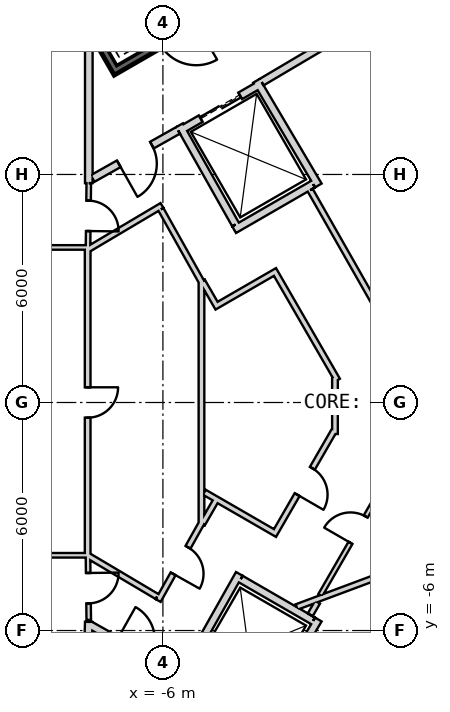
"""IFC4 building model, lengths in metres.
Left out: names, types, materials, properties, quantities, classifications, styles, units other than length and angle.
Written with IfcOpenShell. Run it as: python <this file> out.ifc"""

import sys

from ifc_helpers import new_model, si_unit, direction, frame, frame_2d, origin, place, context, subcontext, project, spatial, rectangle, extrude, element, fill, save


model = new_model("IFC4")
c1 = context("Model", 3, precision=1e-05, world=origin(), true_north=direction((0.0, 1.0)))
c2 = subcontext(c1, "Body", "Model", "MODEL_VIEW")
j1 = project(units=[si_unit("LENGTHUNIT", "METRE"), si_unit("PLANEANGLEUNIT", "RADIAN")], contexts=[c1])
p1 = place(None, origin())
s1 = spatial("IfcSite", under=j1, at=p1, CompositionType="ELEMENT")
p2 = place(p1, origin())
s2 = spatial("IfcBuilding", under=s1, at=p2, CompositionType="ELEMENT")
p3 = place(p2, frame((0.0, 0.0, 404.8)))
s3 = spatial("IfcBuildingStorey", under=s2, at=p3, CompositionType="ELEMENT", Elevation=404.8)
p4 = place(p3, frame((19.475, 2.208, 0.0), z_axis=(0.0, 0.0, 1.0), x_axis=(-0.866028369851, 0.499994862586, 0.0)))
e1 = element("IfcWall", 1, at=p4, inside=s3, PredefinedType="SHEAR", context=c2, shape_type="SweptSolid", body=[
    extrude(rectangle(XDim=31.523, YDim=0.9, at=frame_2d((15.762, 0.0))), origin(), (0.0, 0.0, 1.0), 5.5),
])
p5 = place(p4, frame((3.612, 0.0, 0.0)))
e2 = element("IfcOpeningElement", 2, at=p5, cuts=e1, PredefinedType="OPENING", context=c2, shape_type="SweptSolid", body=[
    extrude(rectangle(XDim=1.2, YDim=2.4, at=frame_2d((0.6, 1.2))), frame((0.0, 0.46, 0.0), z_axis=(0.0, -1.0, 0.0), x_axis=(1.0, 0.0, 0.0)), (0.0, 0.0, 1.0), 0.92),
])
p6 = place(p4, frame((26.712, 0.0, 0.0)))
e3 = element("IfcOpeningElement", 3, at=p6, cuts=e1, PredefinedType="OPENING", context=c2, shape_type="SweptSolid", body=[
    extrude(rectangle(XDim=1.2, YDim=2.4, at=frame_2d((0.6, 1.2))), frame((0.0, 0.46, 0.0), z_axis=(0.0, -1.0, 0.0), x_axis=(1.0, 0.0, 0.0)), (0.0, 0.0, 1.0), 0.92),
])
p7 = place(p3, frame((-7.825, -17.97, 0.0), z_axis=(0.0, 0.0, 1.0), x_axis=(0.866028369851, 0.499994862586, 0.0)))
e4 = element("IfcWall", 4, at=p7, inside=s3, PredefinedType="SHEAR", context=c2, shape_type="SweptSolid", body=[
    extrude(rectangle(XDim=31.523, YDim=0.9, at=frame_2d((15.762, 0.0))), origin(), (0.0, 0.0, 1.0), 5.5),
])
p8 = place(p7, frame((7.062, 0.0, 0.0)))
e5 = element("IfcOpeningElement", 5, at=p8, cuts=e4, PredefinedType="OPENING", context=c2, shape_type="SweptSolid", body=[
    extrude(rectangle(XDim=1.2, YDim=2.4, at=frame_2d((0.6, 1.2))), frame((0.0, 0.46, 0.0), z_axis=(0.0, -1.0, 0.0), x_axis=(1.0, 0.0, 0.0)), (0.0, 0.0, 1.0), 0.92),
])
p9 = place(p7, frame((9.762, 0.0, 0.0)))
e6 = element("IfcOpeningElement", 6, at=p9, cuts=e4, PredefinedType="OPENING", context=c2, shape_type="SweptSolid", body=[
    extrude(rectangle(XDim=1.2, YDim=2.4, at=frame_2d((0.6, 1.2))), frame((0.0, 0.46, 0.0), z_axis=(0.0, -1.0, 0.0), x_axis=(1.0, 0.0, 0.0)), (0.0, 0.0, 1.0), 0.92),
])
p10 = place(p7, frame((17.862, 0.0, 0.0)))
e7 = element("IfcOpeningElement", 7, at=p10, cuts=e4, PredefinedType="OPENING", context=c2, shape_type="SweptSolid", body=[
    extrude(rectangle(XDim=1.2, YDim=2.4, at=frame_2d((0.6, 1.2))), frame((0.0, 0.46, 0.0), z_axis=(0.0, -1.0, 0.0), x_axis=(1.0, 0.0, 0.0)), (0.0, 0.0, 1.0), 0.92),
])
p11 = place(p7, frame((20.562, 0.0, 0.0)))
e8 = element("IfcOpeningElement", 8, at=p11, cuts=e4, PredefinedType="OPENING", context=c2, shape_type="SweptSolid", body=[
    extrude(rectangle(XDim=1.2, YDim=2.4, at=frame_2d((0.6, 1.2))), frame((0.0, 0.46, 0.0), z_axis=(0.0, -1.0, 0.0), x_axis=(1.0, 0.0, 0.0)), (0.0, 0.0, 1.0), 0.92),
])
p12 = place(p7, frame((26.712, 0.0, 0.0)))
e9 = element("IfcOpeningElement", 9, at=p12, cuts=e4, PredefinedType="OPENING", context=c2, shape_type="SweptSolid", body=[
    extrude(rectangle(XDim=1.2, YDim=2.4, at=frame_2d((0.6, 1.2))), frame((0.0, 0.46, 0.0), z_axis=(0.0, -1.0, 0.0), x_axis=(1.0, 0.0, 0.0)), (0.0, 0.0, 1.0), 0.92),
])
p13 = place(p7, frame((3.612, 0.0, 0.0)))
e10 = element("IfcOpeningElement", 10, at=p13, cuts=e4, PredefinedType="OPENING", context=c2, shape_type="SweptSolid", body=[
    extrude(rectangle(XDim=1.2, YDim=2.4, at=frame_2d((0.6, 1.2))), frame((0.0, 0.46, 0.0), z_axis=(0.0, -1.0, 0.0), x_axis=(1.0, 0.0, 0.0)), (0.0, 0.0, 1.0), 0.92),
])
p14 = place(p3, frame((-11.245, 15.678, -0.3), z_axis=(0.0, 0.0, 1.0), x_axis=(0.499977274689, -0.866038523851, 0.0)))
e11 = element("IfcWall", 11, at=p14, inside=s3, PredefinedType="SHEAR", context=c2, shape_type="SweptSolid", body=[
    extrude(rectangle(XDim=8.1, YDim=0.2, at=frame_2d((4.05, 0.0))), origin(), (0.0, 0.0, 1.0), 5.55),
])
p15 = place(p3, frame((-7.159, 8.8, -0.3), z_axis=(0.0, 0.0, 1.0), x_axis=(0.866047807691, 0.499961193289, 0.0)))
e12 = element("IfcWall", 12, at=p15, inside=s3, PredefinedType="SHEAR", context=c2, shape_type="SweptSolid", body=[
    extrude(rectangle(XDim=3.6, YDim=0.2, at=frame_2d((1.8, 0.0))), origin(), (0.0, 0.0, 1.0), 5.55),
])
p16 = place(p15, frame((1.25, 0.0, 0.3)))
e13 = element("IfcOpeningElement", 13, at=p16, cuts=e12, PredefinedType="OPENING", context=c2, shape_type="SweptSolid", body=[
    extrude(rectangle(XDim=1.1, YDim=2.1, at=frame_2d((0.55, 1.05))), frame((0.0, 0.11, 0.0), z_axis=(0.0, -1.0, 0.0), x_axis=(1.0, 0.0, 0.0)), (0.0, 0.0, 1.0), 0.22),
])
p17 = place(p3, frame((-5.524, 7.168, 0.0), z_axis=(0.0, 0.0, 1.0), x_axis=(0.866024647952, 0.500001309137, 0.0)))
e14 = element("IfcWall", 14, at=p17, inside=s3, PredefinedType="PLUMBINGWALL", context=c2, shape_type="SweptSolid", body=[
    extrude(rectangle(XDim=2.4, YDim=0.2, at=frame_2d((1.2, 0.0))), origin(), (0.0, 0.0, 1.0), 5.25),
])
p18 = place(p17, frame((0.6, 0.0, 0.0)))
e15 = element("IfcOpeningElement", 15, at=p18, cuts=e14, PredefinedType="OPENING", context=c2, shape_type="SweptSolid", body=[
    extrude(rectangle(XDim=1.2, YDim=2.4, at=frame_2d((0.6, 1.2))), frame((0.0, 0.11, 0.0), z_axis=(0.0, -1.0, 0.0), x_axis=(1.0, 0.0, 0.0)), (0.0, 0.0, 1.0), 0.22),
])
p19 = place(p3, frame((-3.538, 8.465, 0.0), z_axis=(0.0, 0.0, 1.0), x_axis=(0.508616218331, -0.860993346345, 0.0)))
e16 = element("IfcWall", 16, at=p19, inside=s3, PredefinedType="PLUMBINGWALL", context=c2, shape_type="SweptSolid", body=[
    extrude(rectangle(XDim=3.2, YDim=0.2, at=frame_2d((1.6, 0.0))), origin(), (0.0, 0.0, 1.0), 5.25),
])
p20 = place(p3, frame((-2.047, 5.746, 0.0), z_axis=(0.0, 0.0, 1.0), x_axis=(-0.866024647952, -0.500001309137, 0.0)))
e17 = element("IfcWall", 17, at=p20, inside=s3, PredefinedType="PLUMBINGWALL", context=c2, shape_type="SweptSolid", body=[
    extrude(rectangle(XDim=2.4, YDim=0.2, at=frame_2d((1.2, 0.0))), origin(), (0.0, 0.0, 1.0), 5.25),
])
p21 = place(p3, frame((-5.562, 7.296, 0.0), z_axis=(0.0, 0.0, 1.0), x_axis=(0.49134651263, -0.870964180966, 0.0)))
e18 = element("IfcWall", 18, at=p21, inside=s3, PredefinedType="PLUMBINGWALL", context=c2, shape_type="SweptSolid", body=[
    extrude(rectangle(XDim=3.0, YDim=0.2, at=frame_2d((1.5, 0.0))), origin(), (0.0, 0.0, 1.0), 5.25),
])
p22 = place(p3, frame((-3.953, -4.646, 0.0), z_axis=(0.0, 0.0, 1.0), x_axis=(0.86605622881, -0.499946605688, 0.0)))
e19 = element("IfcWall", 19, at=p22, inside=s3, PredefinedType="PLUMBINGWALL", context=c2, shape_type="SweptSolid", body=[
    extrude(rectangle(XDim=2.2, YDim=0.2, at=frame_2d((1.1, 0.0))), origin(), (0.0, 0.0, 1.0), 5.25),
])
p23 = place(p3, frame((-1.91, -5.71, 0.0), z_axis=(0.0, 0.0, 1.0), x_axis=(-0.508616218331, -0.860993346345, 0.0)))
e20 = element("IfcWall", 20, at=p23, inside=s3, PredefinedType="PLUMBINGWALL", context=c2, shape_type="SweptSolid", body=[
    extrude(rectangle(XDim=3.2, YDim=0.2, at=frame_2d((1.6, 0.0))), origin(), (0.0, 0.0, 1.0), 5.25),
])
p24 = place(p3, frame((-3.99, -4.509, 0.0), z_axis=(0.0, 0.0, 1.0), x_axis=(-0.491358283181, -0.870957540612, 0.0)))
e21 = element("IfcWall", 21, at=p24, inside=s3, PredefinedType="PLUMBINGWALL", context=c2, shape_type="SweptSolid", body=[
    extrude(rectangle(XDim=3.2, YDim=0.2, at=frame_2d((1.6, 0.0))), origin(), (0.0, 0.0, 1.0), 5.25),
])
p25 = place(p3, frame((-7.95, 4.08, 0.0), z_axis=(0.0, 0.0, 1.0), x_axis=(-1.0, 0.0, 0.0)))
e22 = element("IfcWall", 22, at=p25, inside=s3, PredefinedType="PARTITIONING", context=c2, shape_type="SweptSolid", body=[
    extrude(rectangle(XDim=3.25, YDim=0.12, at=frame_2d((1.625, 0.0))), origin(), (0.0, 0.0, 1.0), 5.25),
])
p26 = place(p3, frame((-7.95, 5.772, 0.0), z_axis=(0.0, 0.0, 1.0), x_axis=(0.0, 1.0, 0.0)))
e23 = element("IfcWall", 23, at=p26, inside=s3, PredefinedType="PARTITIONING", context=c2, shape_type="SweptSolid", body=[
    extrude(rectangle(XDim=3.578, YDim=0.2, at=frame_2d((1.789, 0.0))), origin(), (0.0, 0.0, 1.0), 5.25),
])
p27 = place(p3, frame((-7.971, 4.05, 0.0), z_axis=(0.0, 0.0, 1.0), x_axis=(0.012047318415, 0.999927428426, 0.0)))
e24 = element("IfcWall", 24, at=p27, inside=s3, PredefinedType="PARTITIONING", context=c2, shape_type="SweptSolid", body=[
    extrude(rectangle(XDim=1.723, YDim=0.12, at=frame_2d((0.861, 0.0))), origin(), (0.0, 0.0, 1.0), 5.25),
])
p28 = place(p27, frame((0.461, 0.0, 0.0)))
e25 = element("IfcOpeningElement", 25, at=p28, cuts=e24, PredefinedType="OPENING", context=c2, shape_type="SweptSolid", body=[
    extrude(rectangle(XDim=0.8, YDim=2.1, at=frame_2d((0.4, 1.05))), frame((0.0, 0.07, 0.0), z_axis=(0.0, -1.0, 0.0), x_axis=(1.0, 0.0, 0.0)), (0.0, 0.0, 1.0), 0.14),
])
p29 = place(p3, frame((-11.2, -4.02, 0.0), z_axis=(0.0, 0.0, 1.0), x_axis=(1.0, 0.0, 0.0)))
e26 = element("IfcWall", 26, at=p29, inside=s3, PredefinedType="PARTITIONING", context=c2, shape_type="SweptSolid", body=[
    extrude(rectangle(XDim=3.25, YDim=0.12, at=frame_2d((1.625, 0.0))), origin(), (0.0, 0.0, 1.0), 5.25),
])
p30 = place(p29, frame((1.225, 0.0, 0.0)))
e27 = element("IfcOpeningElement", 27, at=p30, cuts=e26, PredefinedType="OPENING", context=c2, shape_type="SweptSolid", body=[
    extrude(rectangle(XDim=0.8, YDim=2.1, at=frame_2d((0.4, 1.05))), frame((0.0, 0.07, 0.0), z_axis=(0.0, -1.0, 0.0), x_axis=(1.0, 0.0, 0.0)), (0.0, 0.0, 1.0), 0.14),
])
p31 = place(p3, frame((-7.98, 4.05, 0.0), z_axis=(0.0, 0.0, 1.0), x_axis=(0.0, -1.0, 0.0)))
e28 = element("IfcWall", 28, at=p31, inside=s3, PredefinedType="PLUMBINGWALL", context=c2, shape_type="SweptSolid", body=[
    extrude(rectangle(XDim=8.1, YDim=0.15, at=frame_2d((4.05, 0.0))), origin(), (0.0, 0.0, 1.0), 5.25),
])
p32 = place(p31, frame((3.65, 0.0, 0.0)))
e29 = element("IfcOpeningElement", 29, at=p32, cuts=e28, PredefinedType="OPENING", context=c2, shape_type="SweptSolid", body=[
    extrude(rectangle(XDim=0.8, YDim=2.1, at=frame_2d((0.4, 1.05))), frame((0.0, 0.085, 0.0), z_axis=(0.0, -1.0, 0.0), x_axis=(1.0, 0.0, 0.0)), (0.0, 0.0, 1.0), 0.17),
])
p33 = place(p3, frame((-7.983, -6.85, 0.0), z_axis=(0.0, 0.0, 1.0), x_axis=(0.030803413295, 0.999525462272, 0.0)))
e30 = element("IfcWall", 30, at=p33, inside=s3, PredefinedType="PARTITIONING", context=c2, shape_type="SweptSolid", body=[
    extrude(rectangle(XDim=1.078, YDim=0.2, at=frame_2d((0.539, 0.0))), origin(), (0.0, 0.0, 1.0), 5.25),
])
p34 = place(p3, frame((-7.951, -5.721, 0.0), z_axis=(0.0, 0.0, 1.0), x_axis=(-0.011976938133, 0.999928273904, 0.0)))
e31 = element("IfcWall", 31, at=p34, inside=s3, PredefinedType="PARTITIONING", context=c2, shape_type="SweptSolid", body=[
    extrude(rectangle(XDim=1.671, YDim=0.12, at=frame_2d((0.836, 0.0))), origin(), (0.0, 0.0, 1.0), 5.25),
])
p35 = place(p34, frame((0.436, 0.0, 0.0)))
e32 = element("IfcOpeningElement", 32, at=p35, cuts=e31, PredefinedType="OPENING", context=c2, shape_type="SweptSolid", body=[
    extrude(rectangle(XDim=0.8, YDim=2.1, at=frame_2d((0.4, 1.05))), frame((0.0, 0.07, 0.0), z_axis=(0.0, -1.0, 0.0), x_axis=(1.0, 0.0, 0.0)), (0.0, 0.0, 1.0), 0.14),
])
p36 = place(p3, frame((0.483, 8.936, 0.0), z_axis=(0.0, 0.0, 1.0), x_axis=(-0.874315691004, 0.485357674776, 0.0)))
e33 = element("IfcWall", 33, at=p36, inside=s3, PredefinedType="PLUMBINGWALL", context=c2, shape_type="SweptSolid", body=[
    extrude(rectangle(XDim=1.671, YDim=0.15, at=frame_2d((0.836, 0.0))), origin(), (0.0, 0.0, 1.0), 5.25),
])
p37 = place(p3, frame((-1.056, 9.818, 0.0), z_axis=(0.0, 0.0, 1.0), x_axis=(-0.860599924646, -0.509281621207, 0.0)))
e34 = element("IfcWall", 34, at=p37, inside=s3, PredefinedType="PARTITIONING", context=c2, shape_type="SweptSolid", body=[
    extrude(rectangle(XDim=2.725, YDim=0.2, at=frame_2d((1.362, 0.0))), origin(), (0.0, 0.0, 1.0), 5.25),
])
p38 = place(p3, frame((-5.6, 7.16, 0.0), z_axis=(0.0, 0.0, 1.0), x_axis=(-0.871350695252, -0.490660744185, 0.0)))
e35 = element("IfcWall", 35, at=p38, inside=s3, PredefinedType="PARTITIONING", context=c2, shape_type="SweptSolid", body=[
    extrude(rectangle(XDim=2.582, YDim=0.2, at=frame_2d((1.291, 0.0))), origin(), (0.0, 0.0, 1.0), 5.25),
])
p39 = place(p38, frame((0.791, 0.0, 0.0)))
e36 = element("IfcOpeningElement", 36, at=p39, cuts=e35, PredefinedType="OPENING", context=c2, shape_type="SweptSolid", body=[
    extrude(rectangle(XDim=1.0, YDim=2.1, at=frame_2d((0.5, 1.05))), frame((0.0, 0.11, 0.0), z_axis=(0.0, -1.0, 0.0), x_axis=(1.0, 0.0, 0.0)), (0.0, 0.0, 1.0), 0.22),
])
p40 = place(p3, frame((-7.96, -5.831, 0.0), z_axis=(0.0, 0.0, 1.0), x_axis=(0.871327438366, -0.490702043148, 0.0)))
e37 = element("IfcWall", 37, at=p40, inside=s3, PredefinedType="PARTITIONING", context=c2, shape_type="SweptSolid", body=[
    extrude(rectangle(XDim=2.708, YDim=0.2, at=frame_2d((1.354, 0.0))), origin(), (0.0, 0.0, 1.0), 5.25),
])
p41 = place(p40, frame((0.86, 0.0, 0.0)))
e38 = element("IfcOpeningElement", 38, at=p41, cuts=e37, PredefinedType="OPENING", context=c2, shape_type="SweptSolid", body=[
    extrude(rectangle(XDim=1.0, YDim=2.1, at=frame_2d((0.5, 1.05))), frame((0.0, 0.11, 0.0), z_axis=(0.0, -1.0, 0.0), x_axis=(1.0, 0.0, 0.0)), (0.0, 0.0, 1.0), 0.22),
])
p42 = place(p3, frame((-2.124, 5.586, 0.0), z_axis=(0.0, 0.0, 1.0), x_axis=(0.494514430604, -0.869169418424, 0.0)))
e39 = element("IfcWall", 39, at=p42, inside=s3, PredefinedType="PLUMBINGWALL", context=c2, shape_type="SweptSolid", body=[
    extrude(rectangle(XDim=4.534, YDim=0.15, at=frame_2d((2.267, 0.0))), origin(), (0.0, 0.0, 1.0), 5.25),
])
p43 = place(p3, frame((4.807, -2.659, 0.0), z_axis=(0.0, 0.0, 1.0), x_axis=(-0.936818342118, -0.349816228714, 0.0)))
e40 = element("IfcWall", 40, at=p43, inside=s3, PredefinedType="PLUMBINGWALL", context=c2, shape_type="SweptSolid", body=[
    extrude(rectangle(XDim=7.78, YDim=0.15, at=frame_2d((3.89, 0.0))), origin(), (0.0, 0.0, 1.0), 5.25),
])
p44 = place(p3, frame((0.182, -1.535, 0.0), z_axis=(0.0, 0.0, 1.0), x_axis=(-0.499988401207, -0.866032100247, 0.0)))
e41 = element("IfcWall", 41, at=p44, inside=s3, PredefinedType="PARTITIONING", context=c2, shape_type="SweptSolid", body=[
    extrude(rectangle(XDim=4.079, YDim=0.12, at=frame_2d((2.04, 0.0))), origin(), (0.0, 0.0, 1.0), 5.25),
])
p45 = place(p44, frame((1.691, 0.0, 0.0)))
e42 = element("IfcOpeningElement", 42, at=p45, cuts=e41, PredefinedType="OPENING", context=c2, shape_type="SweptSolid", body=[
    extrude(rectangle(XDim=0.8, YDim=2.1, at=frame_2d((0.4, 1.05))), frame((0.0, 0.07, 0.0), z_axis=(0.0, -1.0, 0.0), x_axis=(1.0, 0.0, 0.0)), (0.0, 0.0, 1.0), 0.14),
])
p46 = place(p3, frame((-1.932, -5.256, 0.0), z_axis=(0.0, 0.0, 1.0), x_axis=(-0.499777709171, -0.866153705422, 0.0)))
e43 = element("IfcWall", 43, at=p46, inside=s3, PredefinedType="PLUMBINGWALL", context=c2, shape_type="SweptSolid", body=[
    extrude(rectangle(XDim=0.383, YDim=0.15, at=frame_2d((0.191, 0.0))), origin(), (0.0, 0.0, 1.0), 5.25),
])
p47 = place(p3, frame((-4.985, -3.235, 0.0), z_axis=(0.0, 0.0, 1.0), x_axis=(0.0, 1.0, 0.0)))
e44 = element("IfcWall", 44, at=p47, inside=s3, PredefinedType="PLUMBINGWALL", context=c2, shape_type="SweptSolid", body=[
    extrude(rectangle(XDim=6.469, YDim=0.15, at=frame_2d((3.235, 0.0))), origin(), (0.0, 0.0, 1.0), 5.25),
])
p48 = place(p3, frame((-6.125, -5.211, 0.0), z_axis=(0.0, 0.0, 1.0), x_axis=(0.488762436737, 0.87241691893, 0.0)))
e45 = element("IfcWall", 45, at=p48, inside=s3, PredefinedType="PLUMBINGWALL", context=c2, shape_type="SweptSolid", body=[
    extrude(rectangle(XDim=2.337, YDim=0.15, at=frame_2d((1.168, 0.0))), origin(), (0.0, 0.0, 1.0), 5.25),
])
p49 = place(p48, frame((0.806, 0.0, 0.0)))
e46 = element("IfcOpeningElement", 46, at=p49, cuts=e45, PredefinedType="OPENING", context=c2, shape_type="SweptSolid", body=[
    extrude(rectangle(XDim=0.8, YDim=2.1, at=frame_2d((0.4, 1.05))), frame((0.0, 0.085, 0.0), z_axis=(0.0, -1.0, 0.0), x_axis=(1.0, 0.0, 0.0)), (0.0, 0.0, 1.0), 0.17),
])
p50 = place(p3, frame((-7.95, -4.041, 0.0), z_axis=(0.0, 0.0, 1.0), x_axis=(0.860090281069, -0.510141851263, 0.0)))
e47 = element("IfcWall", 47, at=p50, inside=s3, PredefinedType="PLUMBINGWALL", context=c2, shape_type="SweptSolid", body=[
    extrude(rectangle(XDim=2.089, YDim=0.15, at=frame_2d((1.045, 0.0))), origin(), (0.0, 0.0, 1.0), 5.25),
])
p51 = place(p3, frame((-6.024, 5.183, 0.0), z_axis=(0.0, 0.0, 1.0), x_axis=(-0.860126804455, -0.510080268447, 0.0)))
e48 = element("IfcWall", 48, at=p51, inside=s3, PredefinedType="PLUMBINGWALL", context=c2, shape_type="SweptSolid", body=[
    extrude(rectangle(XDim=2.24, YDim=0.15, at=frame_2d((1.12, 0.0))), origin(), (0.0, 0.0, 1.0), 5.25),
])
p52 = place(p3, frame((-4.983, 3.172, 0.0), z_axis=(0.0, 0.0, 1.0), x_axis=(-0.488701962514, 0.872450796226, 0.0)))
e49 = element("IfcWall", 49, at=p52, inside=s3, PredefinedType="PLUMBINGWALL", context=c2, shape_type="SweptSolid", body=[
    extrude(rectangle(XDim=2.187, YDim=0.15, at=frame_2d((1.093, 0.0))), origin(), (0.0, 0.0, 1.0), 5.25),
])
p53 = place(p3, frame((-4.551, 2.482, 0.0), z_axis=(0.0, 0.0, 1.0), x_axis=(-0.499852395195, 0.866110606688, 0.0)))
e50 = element("IfcWall", 50, at=p53, inside=s3, PredefinedType="PLUMBINGWALL", context=c2, shape_type="SweptSolid", body=[
    extrude(rectangle(XDim=0.813, YDim=0.15, at=frame_2d((0.407, 0.0))), origin(), (0.0, 0.0, 1.0), 5.25),
])
p54 = place(p3, frame((-2.986, 3.472, 0.0), z_axis=(0.0, 0.0, 1.0), x_axis=(-0.866059624469, -0.499940723351, 0.0)))
e51 = element("IfcWall", 51, at=p54, inside=s3, PredefinedType="PLUMBINGWALL", context=c2, shape_type="SweptSolid", body=[
    extrude(rectangle(XDim=1.775, YDim=0.15, at=frame_2d((0.888, 0.0))), origin(), (0.0, 0.0, 1.0), 5.25),
])
p55 = place(p3, frame((-1.407, 0.587, 0.0), z_axis=(0.0, 0.0, 1.0), x_axis=(-0.500029427677, 0.866008413041, 0.0)))
e52 = element("IfcWall", 52, at=p55, inside=s3, PredefinedType="PLUMBINGWALL", context=c2, shape_type="SweptSolid", body=[
    extrude(rectangle(XDim=3.213, YDim=0.15, at=frame_2d((1.606, 0.0))), origin(), (0.0, 0.0, 1.0), 5.25),
])
p56 = place(p3, frame((-1.472, -0.83, 0.0), z_axis=(0.0, 0.0, 1.0), x_axis=(0.0, 1.0, 0.0)))
e53 = element("IfcWall", 53, at=p56, inside=s3, PredefinedType="PLUMBINGWALL", context=c2, shape_type="SweptSolid", body=[
    extrude(rectangle(XDim=1.507, YDim=0.15, at=frame_2d((0.753, 0.0))), origin(), (0.0, 0.0, 1.0), 5.25),
])
p57 = place(p3, frame((-3.089, -3.5, 0.0), z_axis=(0.0, 0.0, 1.0), x_axis=(0.500025362525, 0.866010760229, 0.0)))
e54 = element("IfcWall", 54, at=p57, inside=s3, PredefinedType="PLUMBINGWALL", context=c2, shape_type="SweptSolid", body=[
    extrude(rectangle(XDim=3.209, YDim=0.15, at=frame_2d((1.604, 0.0))), origin(), (0.0, 0.0, 1.0), 5.25),
])
p58 = place(p57, frame((1.242, 0.0, 0.0)))
e55 = element("IfcOpeningElement", 55, at=p58, cuts=e54, PredefinedType="OPENING", context=c2, shape_type="SweptSolid", body=[
    extrude(rectangle(XDim=0.8, YDim=2.1, at=frame_2d((0.4, 1.05))), frame((0.0, 0.085, 0.0), z_axis=(0.0, -1.0, 0.0), x_axis=(1.0, 0.0, 0.0)), (0.0, 0.0, 1.0), 0.17),
])
p59 = place(p3, frame((-4.91, -2.361, 0.0), z_axis=(0.0, 0.0, 1.0), x_axis=(0.866022705876, -0.500004672885, 0.0)))
e56 = element("IfcWall", 56, at=p59, inside=s3, PredefinedType="PLUMBINGWALL", context=c2, shape_type="SweptSolid", body=[
    extrude(rectangle(XDim=2.072, YDim=0.15, at=frame_2d((1.036, 0.0))), origin(), (0.0, 0.0, 1.0), 5.25),
])
p60 = place(p3, frame((-4.957, -3.187, 0.0), z_axis=(0.0, 0.0, 1.0), x_axis=(0.499860530385, 0.866105911632, 0.0)))
e57 = element("IfcWall", 57, at=p60, inside=s3, PredefinedType="PLUMBINGWALL", context=c2, shape_type="SweptSolid", body=[
    extrude(rectangle(XDim=0.663, YDim=0.15, at=frame_2d((0.332, 0.0))), origin(), (0.0, 0.0, 1.0), 5.25),
])
p61 = place(p39, origin())
e58 = element("IfcDoor", 58, at=p61, inside=s3, OperationType="SINGLE_SWING_RIGHT", PredefinedType="USERDEFINED", context=c2, shape_type="SweptSolid", body=[
    extrude(rectangle(XDim=1.0, YDim=2.1, at=frame_2d((0.5, 1.05))), frame((0.0, 0.025, 0.0), z_axis=(0.0, -1.0, 0.0), x_axis=(1.0, 0.0, 0.0)), (0.0, 0.0, 1.0), 0.05),
])
fill(e36, e58)
p62 = place(p18, origin())
e59 = element("IfcDoor", 59, at=p62, inside=s3, OperationType="SLIDING_TO_LEFT", PredefinedType="USERDEFINED", context=c2, shape_type="SweptSolid", body=[
    extrude(rectangle(XDim=1.2, YDim=2.4, at=frame_2d((0.6, 1.2))), frame((0.0, 0.025, 0.0), z_axis=(0.0, -1.0, 0.0), x_axis=(1.0, 0.0, 0.0)), (0.0, 0.0, 1.0), 0.05),
])
fill(e15, e59)
p63 = place(p45, origin())
e60 = element("IfcDoor", 60, at=p63, inside=s3, OperationType="SINGLE_SWING_RIGHT", PredefinedType="USERDEFINED", context=c2, shape_type="SweptSolid", body=[
    extrude(rectangle(XDim=0.8, YDim=2.1, at=frame_2d((0.4, 1.05))), frame((0.0, 0.025, 0.0), z_axis=(0.0, -1.0, 0.0), x_axis=(1.0, 0.0, 0.0)), (0.0, 0.0, 1.0), 0.05),
])
fill(e42, e60)
p64 = place(p49, origin())
e61 = element("IfcDoor", 61, at=p64, inside=s3, OperationType="SINGLE_SWING_LEFT", PredefinedType="USERDEFINED", context=c2, shape_type="SweptSolid", body=[
    extrude(rectangle(XDim=0.8, YDim=2.1, at=frame_2d((0.4, 1.05))), frame((0.0, 0.025, 0.0), z_axis=(0.0, -1.0, 0.0), x_axis=(1.0, 0.0, 0.0)), (0.0, 0.0, 1.0), 0.05),
])
fill(e46, e61)
p65 = place(p58, origin())
e62 = element("IfcDoor", 62, at=p65, inside=s3, OperationType="SINGLE_SWING_LEFT", PredefinedType="USERDEFINED", context=c2, shape_type="SweptSolid", body=[
    extrude(rectangle(XDim=0.8, YDim=2.1, at=frame_2d((0.4, 1.05))), frame((0.0, 0.025, 0.0), z_axis=(0.0, -1.0, 0.0), x_axis=(1.0, 0.0, 0.0)), (0.0, 0.0, 1.0), 0.05),
])
fill(e55, e62)
p66 = place(p28, origin())
e63 = element("IfcDoor", 63, at=p66, inside=s3, OperationType="SINGLE_SWING_LEFT", PredefinedType="USERDEFINED", context=c2, shape_type="SweptSolid", body=[
    extrude(rectangle(XDim=0.8, YDim=2.1, at=frame_2d((0.4, 1.05))), frame((0.0, 0.025, 0.0), z_axis=(0.0, -1.0, 0.0), x_axis=(1.0, 0.0, 0.0)), (0.0, 0.0, 1.0), 0.05),
])
fill(e25, e63)
p67 = place(p35, origin())
e64 = element("IfcDoor", 64, at=p67, inside=s3, OperationType="SINGLE_SWING_RIGHT", PredefinedType="USERDEFINED", context=c2, shape_type="SweptSolid", body=[
    extrude(rectangle(XDim=0.8, YDim=2.1, at=frame_2d((0.4, 1.05))), frame((0.0, 0.025, 0.0), z_axis=(0.0, -1.0, 0.0), x_axis=(1.0, 0.0, 0.0)), (0.0, 0.0, 1.0), 0.05),
])
fill(e32, e64)
p68 = place(p32, origin())
e65 = element("IfcDoor", 65, at=p68, inside=s3, OperationType="SINGLE_SWING_LEFT", PredefinedType="USERDEFINED", context=c2, shape_type="SweptSolid", body=[
    extrude(rectangle(XDim=0.8, YDim=2.1, at=frame_2d((0.4, 1.05))), frame((0.0, 0.025, 0.0), z_axis=(0.0, -1.0, 0.0), x_axis=(1.0, 0.0, 0.0)), (0.0, 0.0, 1.0), 0.05),
])
fill(e29, e65)
save(model, sys.argv[1])
